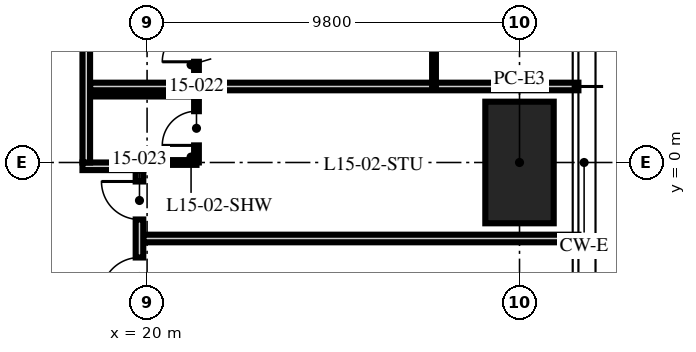
"""IFC4 building model, lengths in metres.
Left out: names, types, materials, properties, quantities, classifications, styles, units other than length and angle.
Written with IfcOpenShell. Run it as: python <this file> out.ifc"""

import sys

from ifc_helpers import new_model, si_unit, direction, frame, frame_2d, origin, origin_2d, place, context, subcontext, project, spatial, rectangle, hollow_rectangle, extrude, element, fill, save


model = new_model("IFC4")
c1 = context("Model", 3, precision=1e-05, world=origin(), true_north=direction((0.0, 1.0)))
c2 = subcontext(c1, "Body", "Model", "MODEL_VIEW")
j1 = project(units=[si_unit("LENGTHUNIT", "METRE"), si_unit("PLANEANGLEUNIT", "RADIAN")], contexts=[c1])
p1 = place(None, origin())
s1 = spatial("IfcSite", under=j1, at=p1, CompositionType="ELEMENT")
p2 = place(p1, origin())
s2 = spatial("IfcBuilding", under=s1, at=p2, CompositionType="ELEMENT")
p3 = place(p2, frame((0.0, 0.0, 62.25)))
s3 = spatial("IfcBuildingStorey", under=s2, at=p3, CompositionType="ELEMENT", Elevation=62.25)
p4 = place(p3, frame((29.8, 0.0, 0.0), z_axis=(0.0, 0.0, 1.0), x_axis=(0.0, 1.0, 0.0)))
e1 = element("IfcColumn", 1, at=p4, inside=s3, PredefinedType="COLUMN", context=c2, shape_type="SweptSolid", body=[
    extrude(hollow_rectangle(XDim=3.2, YDim=1.8, WallThickness=0.2, at=origin_2d()), origin(), (0.0, 0.0, 1.0), 3.75),
])
p5 = place(p3, frame((19.9, -2.0, 0.0), z_axis=(0.0, 0.0, 1.0), x_axis=(1.0, 0.0, 0.0)))
e2 = element("IfcWall", 2, at=p5, inside=s3, PredefinedType="PARTITIONING", context=c2, shape_type="SweptSolid", body=[
    extrude(rectangle(XDim=11.45, YDim=0.2, at=frame_2d((5.725, 0.0))), origin(), (0.0, 0.0, 1.0), 2.71),
])
p6 = place(p3, frame((18.5, 2.0, 0.0), z_axis=(0.0, 0.0, 1.0), x_axis=(1.0, 0.0, 0.0)))
e3 = element("IfcWall", 3, at=p6, inside=s3, PredefinedType="PARTITIONING", context=c2, shape_type="SweptSolid", body=[
    extrude(rectangle(XDim=12.85, YDim=0.2, at=frame_2d((6.425, 0.0))), origin(), (0.0, 0.0, 1.0), 2.71),
])
p7 = place(p3, frame((21.3, 0.0, 0.0), z_axis=(0.0, 0.0, 1.0), x_axis=(0.0, 1.0, 0.0)))
e4 = element("IfcWall", 4, at=p7, inside=s3, PredefinedType="PARTITIONING", context=c2, shape_type="SweptSolid", body=[
    extrude(rectangle(XDim=1.8, YDim=0.125, at=frame_2d((0.9, 0.0))), origin(), (0.0, 0.0, 1.0), 2.492),
])
p8 = place(p7, frame((0.45, 0.0, 0.0)))
e5 = element("IfcOpeningElement", 5, at=p8, cuts=e4, PredefinedType="OPENING", context=c2, shape_type="SweptSolid", body=[
    extrude(rectangle(XDim=0.9, YDim=2.1, at=frame_2d((0.45, 1.05))), frame((0.0, 0.073, 0.0), z_axis=(0.0, -1.0, 0.0), x_axis=(1.0, 0.0, 0.0)), (0.0, 0.0, 1.0), 0.145),
])
p9 = place(p3, frame((19.97, 0.0, 0.0), z_axis=(0.0, 0.0, 1.0), x_axis=(1.0, 0.0, 0.0)))
e6 = element("IfcWall", 6, at=p9, inside=s3, PredefinedType="PARTITIONING", context=c2, shape_type="SweptSolid", body=[
    extrude(rectangle(XDim=1.33, YDim=0.125, at=frame_2d((0.665, 0.0))), origin(), (0.0, 0.0, 1.0), 2.492),
])
p10 = place(p3, frame((18.5, 1.8, 0.0), z_axis=(0.0, 0.0, 1.0), x_axis=(1.0, 0.0, 0.0)))
e7 = element("IfcWall", 7, at=p10, inside=s3, PredefinedType="PARTITIONING", context=c2, shape_type="SweptSolid", body=[
    extrude(rectangle(XDim=2.8, YDim=0.125, at=frame_2d((1.4, 0.0))), origin(), (0.0, 0.0, 1.0), 3.5),
])
p11 = place(p3, frame((27.55, 2.0, 0.0), z_axis=(0.0, 0.0, 1.0), x_axis=(0.0, 1.0, 0.0)))
e8 = element("IfcWall", 8, at=p11, inside=s3, PredefinedType="PARTITIONING", context=c2, shape_type="SweptSolid", body=[
    extrude(rectangle(XDim=6.0, YDim=0.1, at=frame_2d((3.0, 0.0))), origin(), (0.0, 0.0, 1.0), 2.61),
])
p12 = place(p11, frame((2.55, 0.0, 0.0)))
e9 = element("IfcOpeningElement", 9, at=p12, cuts=e8, PredefinedType="OPENING", context=c2, shape_type="SweptSolid", body=[
    extrude(rectangle(XDim=0.9, YDim=2.1, at=frame_2d((0.45, 1.05))), frame((0.0, 0.06, 0.0), z_axis=(0.0, -1.0, 0.0), x_axis=(1.0, 0.0, 0.0)), (0.0, 0.0, 1.0), 0.12),
])
p13 = place(p3, frame((21.3, 2.0, 0.0), z_axis=(0.0, 0.0, 1.0), x_axis=(0.0, 1.0, 0.0)))
e10 = element("IfcWall", 10, at=p13, inside=s3, PredefinedType="PARTITIONING", context=c2, shape_type="SweptSolid", body=[
    extrude(rectangle(XDim=4.4, YDim=0.125, at=frame_2d((2.2, 0.0))), origin(), (0.0, 0.0, 1.0), 2.61),
])
p14 = place(p13, frame((0.65, 0.0, 0.0)))
e11 = element("IfcOpeningElement", 11, at=p14, cuts=e10, PredefinedType="OPENING", context=c2, shape_type="SweptSolid", body=[
    extrude(rectangle(XDim=0.9, YDim=2.1, at=frame_2d((0.45, 1.05))), frame((0.0, 0.073, 0.0), z_axis=(0.0, -1.0, 0.0), x_axis=(1.0, 0.0, 0.0)), (0.0, 0.0, 1.0), 0.145),
])
p15 = place(p13, frame((2.85, 0.0, 0.0)))
e12 = element("IfcOpeningElement", 12, at=p15, cuts=e10, PredefinedType="OPENING", context=c2, shape_type="SweptSolid", body=[
    extrude(rectangle(XDim=0.9, YDim=2.1, at=frame_2d((0.45, 1.05))), frame((0.0, 0.073, 0.0), z_axis=(0.0, -1.0, 0.0), x_axis=(1.0, 0.0, 0.0)), (0.0, 0.0, 1.0), 0.145),
])
p16 = place(p3, frame((18.3, -0.1, 0.0), z_axis=(0.0, 0.0, 1.0), x_axis=(1.0, 0.0, 0.0)))
e13 = element("IfcWall", 13, at=p16, inside=s3, PredefinedType="PARTITIONING", context=c2, shape_type="SweptSolid", body=[
    extrude(rectangle(XDim=1.6, YDim=0.2, at=frame_2d((0.8, 0.0))), origin(), (0.0, 0.0, 1.0), 2.492),
])
p17 = place(p3, frame((19.8, -3.8, 0.0), z_axis=(0.0, 0.0, 1.0), x_axis=(0.0, 1.0, 0.0)))
e14 = element("IfcWall", 14, at=p17, inside=s3, PredefinedType="PARTITIONING", context=c2, shape_type="SweptSolid", body=[
    extrude(rectangle(XDim=3.6, YDim=0.2, at=frame_2d((1.8, 0.0))), origin(), (0.0, 0.0, 1.0), 3.5),
])
p18 = place(p17, frame((0.3, 0.0, 0.0)))
e15 = element("IfcOpeningElement", 15, at=p18, cuts=e14, PredefinedType="OPENING", context=c2, shape_type="SweptSolid", body=[
    extrude(rectangle(XDim=1.0, YDim=2.2, at=frame_2d((0.5, 1.1))), frame((0.0, 0.11, 0.0), z_axis=(0.0, -1.0, 0.0), x_axis=(1.0, 0.0, 0.0)), (0.0, 0.0, 1.0), 0.22),
])
p19 = place(p17, frame((2.3, 0.0, 0.0)))
e16 = element("IfcOpeningElement", 16, at=p19, cuts=e14, PredefinedType="OPENING", context=c2, shape_type="SweptSolid", body=[
    extrude(rectangle(XDim=1.0, YDim=2.2, at=frame_2d((0.5, 1.1))), frame((0.0, 0.11, 0.0), z_axis=(0.0, -1.0, 0.0), x_axis=(1.0, 0.0, 0.0)), (0.0, 0.0, 1.0), 0.22),
])
p20 = place(p3, frame((18.4, 0.0, 0.0), z_axis=(0.0, 0.0, 1.0), x_axis=(0.0, 1.0, 0.0)))
e17 = element("IfcWall", 17, at=p20, inside=s3, PredefinedType="PARTITIONING", context=c2, shape_type="SweptSolid", body=[
    extrude(rectangle(XDim=18.3, YDim=0.2, at=frame_2d((9.15, 0.0))), origin(), (0.0, 0.0, 1.0), 2.3),
])
p21 = place(p18, origin())
e18 = element("IfcDoor", 18, at=p21, inside=s3, OperationType="SINGLE_SWING_LEFT", PredefinedType="DOOR", context=c2, shape_type="SweptSolid", body=[
    extrude(rectangle(XDim=1.0, YDim=2.2, at=frame_2d((0.5, 1.1))), frame((0.0, 0.025, 0.0), z_axis=(0.0, -1.0, 0.0), x_axis=(1.0, 0.0, 0.0)), (0.0, 0.0, 1.0), 0.05),
])
fill(e15, e18)
p22 = place(p8, origin())
e19 = element("IfcDoor", 19, at=p22, inside=s3, OperationType="SINGLE_SWING_LEFT", PredefinedType="DOOR", context=c2, shape_type="SweptSolid", body=[
    extrude(rectangle(XDim=0.9, YDim=2.1, at=frame_2d((0.45, 1.05))), frame((0.0, 0.025, 0.0), z_axis=(0.0, -1.0, 0.0), x_axis=(1.0, 0.0, 0.0)), (0.0, 0.0, 1.0), 0.05),
])
fill(e5, e19)
p23 = place(p19, origin())
e20 = element("IfcDoor", 20, at=p23, inside=s3, OperationType="SINGLE_SWING_RIGHT", PredefinedType="DOOR", context=c2, shape_type="SweptSolid", body=[
    extrude(rectangle(XDim=1.0, YDim=2.2, at=frame_2d((0.5, 1.1))), frame((0.0, 0.025, 0.0), z_axis=(0.0, -1.0, 0.0), x_axis=(1.0, 0.0, 0.0)), (0.0, 0.0, 1.0), 0.05),
])
fill(e16, e20)
p24 = place(p14, origin())
e21 = element("IfcDoor", 21, at=p24, inside=s3, OperationType="SINGLE_SWING_LEFT", PredefinedType="DOOR", context=c2, shape_type="SweptSolid", body=[
    extrude(rectangle(XDim=0.9, YDim=2.1, at=frame_2d((0.45, 1.05))), frame((0.0, 0.025, 0.0), z_axis=(0.0, -1.0, 0.0), x_axis=(1.0, 0.0, 0.0)), (0.0, 0.0, 1.0), 0.05),
])
fill(e11, e21)
save(model, sys.argv[1])
